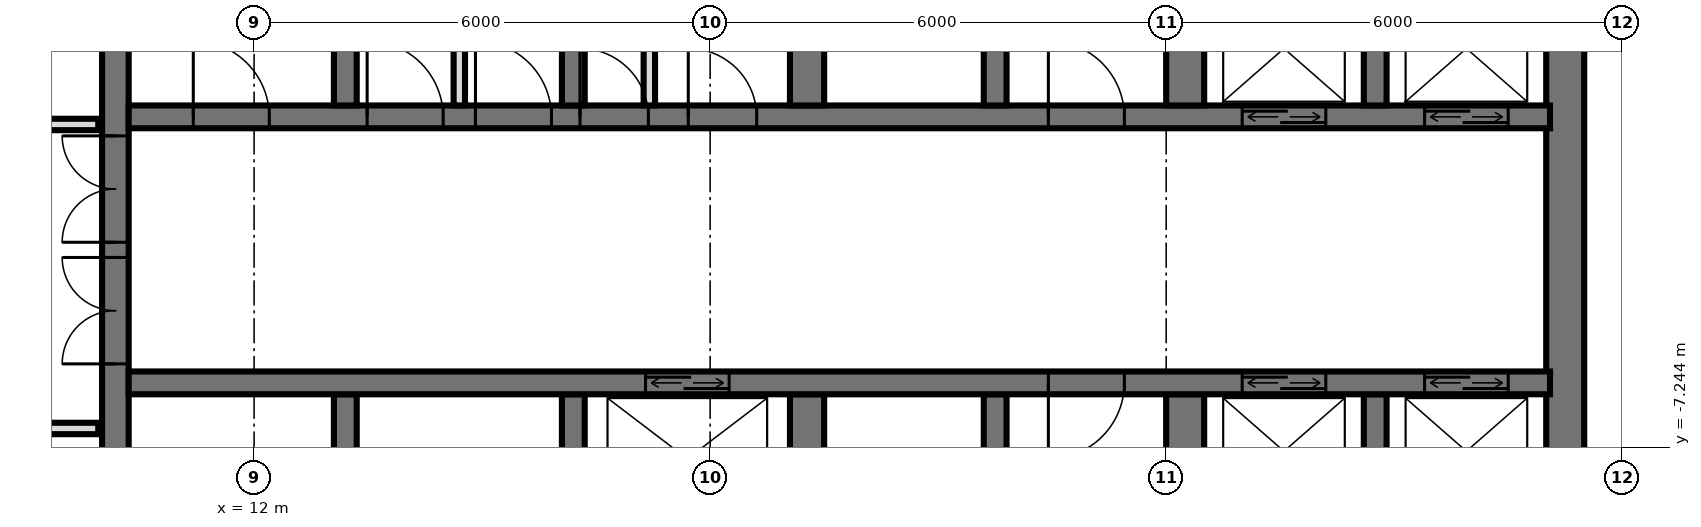
"""IFC4 building model, lengths in metres.
Left out: names, types, materials, properties, quantities, classifications, styles, units other than length and angle.
Written with IfcOpenShell. Run it as: python <this file> out.ifc"""

import sys

from ifc_helpers import new_model, si_unit, direction, frame, frame_2d, origin, place, context, subcontext, project, spatial, rectangle, extrude, element, fill, save


model = new_model("IFC4")
c1 = context("Model", 3, precision=1e-05, world=origin(), true_north=direction((0.0, 1.0)))
c2 = subcontext(c1, "Body", "Model", "MODEL_VIEW")
j1 = project(units=[si_unit("LENGTHUNIT", "METRE"), si_unit("PLANEANGLEUNIT", "RADIAN")], contexts=[c1])
p1 = place(None, origin())
s1 = spatial("IfcSite", under=j1, at=p1, CompositionType="ELEMENT")
p2 = place(p1, origin())
s2 = spatial("IfcBuilding", under=s1, at=p2, CompositionType="ELEMENT")
p3 = place(p2, frame((0.0, 0.0, 81.6)))
s3 = spatial("IfcBuildingStorey", under=s2, at=p3, CompositionType="ELEMENT", Elevation=81.6)
p4 = place(p3, frame((10.175, -14.55, 0.0), z_axis=(0.0, 0.0, 1.0), x_axis=(0.0, 1.0, 0.0)))
e1 = element("IfcWall", 1, at=p4, inside=s3, PredefinedType="SHEAR", context=c2, shape_type="SweptSolid", body=[
    extrude(rectangle(XDim=14.1, YDim=0.35, at=frame_2d((7.05, 0.0))), origin(), (0.0, 0.0, 1.0), 3.6),
])
p5 = place(p4, frame((8.4, 0.0, 0.0)))
e2 = element("IfcOpeningElement", 2, at=p5, cuts=e1, PredefinedType="OPENING", context=c2, shape_type="SweptSolid", body=[
    extrude(rectangle(XDim=1.4, YDim=2.4, at=frame_2d((0.7, 1.2))), frame((0.0, 0.185, 0.0), z_axis=(0.0, -1.0, 0.0), x_axis=(1.0, 0.0, 0.0)), (0.0, 0.0, 1.0), 0.37),
])
p6 = place(p4, frame((10.0, 0.0, 0.0)))
e3 = element("IfcOpeningElement", 3, at=p6, cuts=e1, PredefinedType="OPENING", context=c2, shape_type="SweptSolid", body=[
    extrude(rectangle(XDim=1.4, YDim=2.4, at=frame_2d((0.7, 1.2))), frame((0.0, 0.185, 0.0), z_axis=(0.0, -1.0, 0.0), x_axis=(1.0, 0.0, 0.0)), (0.0, 0.0, 1.0), 0.37),
])
p7 = place(p4, frame((4.0, 0.0, 0.0)))
e4 = element("IfcOpeningElement", 4, at=p7, cuts=e1, PredefinedType="OPENING", context=c2, shape_type="SweptSolid", body=[
    extrude(rectangle(XDim=1.2, YDim=2.1, at=frame_2d((0.6, 1.05))), frame((0.0, 0.185, 0.0), z_axis=(0.0, -1.0, 0.0), x_axis=(1.0, 0.0, 0.0)), (0.0, 0.0, 1.0), 0.37),
])
p8 = place(p3, frame((29.25, -14.55, 0.0), z_axis=(0.0, 0.0, 1.0), x_axis=(0.0, 1.0, 0.0)))
e5 = element("IfcWall", 5, at=p8, inside=s3, PredefinedType="SHEAR", context=c2, shape_type="SweptSolid", body=[
    extrude(rectangle(XDim=14.1, YDim=0.5, at=frame_2d((7.05, 0.0))), origin(), (0.0, 0.0, 1.0), 3.6),
])
p9 = place(p3, frame((10.35, -2.9, 0.0), z_axis=(0.0, 0.0, 1.0), x_axis=(1.0, 0.0, 0.0)))
e6 = element("IfcWall", 6, at=p9, inside=s3, PredefinedType="SHEAR", context=c2, shape_type="SweptSolid", body=[
    extrude(rectangle(XDim=18.7, YDim=0.3, at=frame_2d((9.35, 0.0))), origin(), (0.0, 0.0, 1.0), 3.6),
])
p10 = place(p9, frame((14.65, 0.0, 0.0)))
e7 = element("IfcOpeningElement", 7, at=p10, cuts=e6, PredefinedType="OPENING", context=c2, shape_type="SweptSolid", body=[
    extrude(rectangle(XDim=1.1, YDim=2.1, at=frame_2d((0.55, 1.05))), frame((0.0, 0.16, 0.0), z_axis=(0.0, -1.0, 0.0), x_axis=(1.0, 0.0, 0.0)), (0.0, 0.0, 1.0), 0.32),
])
p11 = place(p9, frame((17.05, 0.0, 0.0)))
e8 = element("IfcOpeningElement", 8, at=p11, cuts=e6, PredefinedType="OPENING", context=c2, shape_type="SweptSolid", body=[
    extrude(rectangle(XDim=1.1, YDim=2.1, at=frame_2d((0.55, 1.05))), frame((0.0, 0.16, 0.0), z_axis=(0.0, -1.0, 0.0), x_axis=(1.0, 0.0, 0.0)), (0.0, 0.0, 1.0), 0.32),
])
p12 = place(p9, frame((5.938, 0.0, 0.0)))
e9 = element("IfcOpeningElement", 9, at=p12, cuts=e6, PredefinedType="OPENING", context=c2, shape_type="SweptSolid", body=[
    extrude(rectangle(XDim=0.9, YDim=2.1, at=frame_2d((0.45, 1.05))), frame((0.0, 0.16, 0.0), z_axis=(0.0, -1.0, 0.0), x_axis=(1.0, 0.0, 0.0)), (0.0, 0.0, 1.0), 0.32),
])
p13 = place(p9, frame((7.363, 0.0, 0.0)))
e10 = element("IfcOpeningElement", 10, at=p13, cuts=e6, PredefinedType="OPENING", context=c2, shape_type="SweptSolid", body=[
    extrude(rectangle(XDim=0.9, YDim=2.1, at=frame_2d((0.45, 1.05))), frame((0.0, 0.16, 0.0), z_axis=(0.0, -1.0, 0.0), x_axis=(1.0, 0.0, 0.0)), (0.0, 0.0, 1.0), 0.32),
])
p14 = place(p9, frame((0.85, 0.0, 0.0)))
e11 = element("IfcOpeningElement", 11, at=p14, cuts=e6, PredefinedType="OPENING", context=c2, shape_type="SweptSolid", body=[
    extrude(rectangle(XDim=1.0, YDim=2.1, at=frame_2d((0.5, 1.05))), frame((0.0, 0.16, 0.0), z_axis=(0.0, -1.0, 0.0), x_axis=(1.0, 0.0, 0.0)), (0.0, 0.0, 1.0), 0.32),
])
p15 = place(p9, frame((3.137, 0.0, 0.0)))
e12 = element("IfcOpeningElement", 12, at=p15, cuts=e6, PredefinedType="OPENING", context=c2, shape_type="SweptSolid", body=[
    extrude(rectangle(XDim=1.0, YDim=2.1, at=frame_2d((0.5, 1.05))), frame((0.0, 0.16, 0.0), z_axis=(0.0, -1.0, 0.0), x_axis=(1.0, 0.0, 0.0)), (0.0, 0.0, 1.0), 0.32),
])
p16 = place(p9, frame((4.562, 0.0, 0.0)))
e13 = element("IfcOpeningElement", 13, at=p16, cuts=e6, PredefinedType="OPENING", context=c2, shape_type="SweptSolid", body=[
    extrude(rectangle(XDim=1.0, YDim=2.1, at=frame_2d((0.5, 1.05))), frame((0.0, 0.16, 0.0), z_axis=(0.0, -1.0, 0.0), x_axis=(1.0, 0.0, 0.0)), (0.0, 0.0, 1.0), 0.32),
])
p17 = place(p9, frame((12.1, 0.0, 0.0)))
e14 = element("IfcOpeningElement", 14, at=p17, cuts=e6, PredefinedType="OPENING", context=c2, shape_type="SweptSolid", body=[
    extrude(rectangle(XDim=1.0, YDim=2.1, at=frame_2d((0.5, 1.05))), frame((0.0, 0.16, 0.0), z_axis=(0.0, -1.0, 0.0), x_axis=(1.0, 0.0, 0.0)), (0.0, 0.0, 1.0), 0.32),
])
p18 = place(p3, frame((10.35, -6.4, 0.0), z_axis=(0.0, 0.0, 1.0), x_axis=(1.0, 0.0, 0.0)))
e15 = element("IfcWall", 15, at=p18, inside=s3, PredefinedType="SHEAR", context=c2, shape_type="SweptSolid", body=[
    extrude(rectangle(XDim=18.7, YDim=0.3, at=frame_2d((9.35, 0.0))), origin(), (0.0, 0.0, 1.0), 3.6),
])
p19 = place(p18, frame((14.65, 0.0, 0.0)))
e16 = element("IfcOpeningElement", 16, at=p19, cuts=e15, PredefinedType="OPENING", context=c2, shape_type="SweptSolid", body=[
    extrude(rectangle(XDim=1.1, YDim=2.1, at=frame_2d((0.55, 1.05))), frame((0.0, 0.16, 0.0), z_axis=(0.0, -1.0, 0.0), x_axis=(1.0, 0.0, 0.0)), (0.0, 0.0, 1.0), 0.32),
])
p20 = place(p18, frame((17.05, 0.0, 0.0)))
e17 = element("IfcOpeningElement", 17, at=p20, cuts=e15, PredefinedType="OPENING", context=c2, shape_type="SweptSolid", body=[
    extrude(rectangle(XDim=1.1, YDim=2.1, at=frame_2d((0.55, 1.05))), frame((0.0, 0.16, 0.0), z_axis=(0.0, -1.0, 0.0), x_axis=(1.0, 0.0, 0.0)), (0.0, 0.0, 1.0), 0.32),
])
p21 = place(p18, frame((6.8, 0.0, 0.0)))
e18 = element("IfcOpeningElement", 18, at=p21, cuts=e15, PredefinedType="OPENING", context=c2, shape_type="SweptSolid", body=[
    extrude(rectangle(XDim=1.1, YDim=2.1, at=frame_2d((0.55, 1.05))), frame((0.0, 0.16, 0.0), z_axis=(0.0, -1.0, 0.0), x_axis=(1.0, 0.0, 0.0)), (0.0, 0.0, 1.0), 0.32),
])
p22 = place(p18, frame((12.1, 0.0, 0.0)))
e19 = element("IfcOpeningElement", 19, at=p22, cuts=e15, PredefinedType="OPENING", context=c2, shape_type="SweptSolid", body=[
    extrude(rectangle(XDim=1.0, YDim=2.1, at=frame_2d((0.5, 1.05))), frame((0.0, 0.16, 0.0), z_axis=(0.0, -1.0, 0.0), x_axis=(1.0, 0.0, 0.0)), (0.0, 0.0, 1.0), 0.32),
])
for number, where, z_axis, x_axis in (
    (20, (13.2, -2.75, 0.0), (0.0, 0.0, 1.0), (0.0, 1.0, 0.0)),
    (21, (13.2, -8.85, 0.0), (0.0, 0.0, 1.0), (0.0, 1.0, 0.0)),
    (22, (16.2, -2.75, 0.0), (0.0, 0.0, 1.0), (0.0, 1.0, 0.0)),
    (23, (16.2, -8.85, 0.0), (0.0, 0.0, 1.0), (0.0, 1.0, 0.0)),
):
    element("IfcWall", number, at=place(p3, frame(where, z_axis=z_axis, x_axis=x_axis)), inside=s3, PredefinedType="SHEAR", context=c2, shape_type="SweptSolid", body=[
        extrude(rectangle(XDim=2.3, YDim=0.3, at=frame_2d((1.15, 0.0))), origin(), (0.0, 0.0, 1.0), 3.6),
    ])
for number, where, z_axis, x_axis in (
    (24, (19.275, -2.75, 0.0), (0.0, 0.0, 1.0), (0.0, 1.0, 0.0)),
    (25, (19.275, -8.85, 0.0), (0.0, 0.0, 1.0), (0.0, 1.0, 0.0)),
):
    element("IfcWall", number, at=place(p3, frame(where, z_axis=z_axis, x_axis=x_axis)), inside=s3, PredefinedType="SHEAR", context=c2, shape_type="SweptSolid", body=[
        extrude(rectangle(XDim=2.3, YDim=0.45, at=frame_2d((1.15, 0.0))), origin(), (0.0, 0.0, 1.0), 3.6),
    ])
for number, where, z_axis, x_axis in (
    (26, (21.75, -2.75, 0.0), (0.0, 0.0, 1.0), (0.0, 1.0, 0.0)),
    (27, (21.75, -8.85, 0.0), (0.0, 0.0, 1.0), (0.0, 1.0, 0.0)),
):
    element("IfcWall", number, at=place(p3, frame(where, z_axis=z_axis, x_axis=x_axis)), inside=s3, PredefinedType="SHEAR", context=c2, shape_type="SweptSolid", body=[
        extrude(rectangle(XDim=2.3, YDim=0.3, at=frame_2d((1.15, 0.0))), origin(), (0.0, 0.0, 1.0), 3.6),
    ])
for number, where, z_axis, x_axis in (
    (28, (24.25, -2.75, 0.0), (0.0, 0.0, 1.0), (0.0, 1.0, 0.0)),
    (29, (24.25, -8.85, 0.0), (0.0, 0.0, 1.0), (0.0, 1.0, 0.0)),
):
    element("IfcWall", number, at=place(p3, frame(where, z_axis=z_axis, x_axis=x_axis)), inside=s3, PredefinedType="SHEAR", context=c2, shape_type="SweptSolid", body=[
        extrude(rectangle(XDim=2.3, YDim=0.5, at=frame_2d((1.15, 0.0))), origin(), (0.0, 0.0, 1.0), 3.6),
    ])
for number, where, z_axis, x_axis in (
    (30, (26.75, -2.75, 0.0), (0.0, 0.0, 1.0), (0.0, 1.0, 0.0)),
    (31, (26.75, -8.85, 0.0), (0.0, 0.0, 1.0), (0.0, 1.0, 0.0)),
):
    element("IfcWall", number, at=place(p3, frame(where, z_axis=z_axis, x_axis=x_axis)), inside=s3, PredefinedType="SHEAR", context=c2, shape_type="SweptSolid", body=[
        extrude(rectangle(XDim=2.3, YDim=0.3, at=frame_2d((1.15, 0.0))), origin(), (0.0, 0.0, 1.0), 3.6),
    ])
for number, where, z_axis, x_axis in (
    (32, (17.2, -2.75, 0.0), (0.0, 0.0, 1.0), (0.0, 1.0, 0.0)),
    (33, (14.7, -2.75, 0.0), (0.0, 0.0, 1.0), (0.0, 1.0, 0.0)),
):
    element("IfcWall", number, at=place(p3, frame(where, z_axis=z_axis, x_axis=x_axis)), inside=s3, PredefinedType="PARTITIONING", context=c2, shape_type="SweptSolid", body=[
        extrude(rectangle(XDim=2.3, YDim=0.15, at=frame_2d((1.15, 0.0))), origin(), (0.0, 0.0, 1.0), 3.3),
    ])
p23 = place(p3, frame((-9.95, -7.0, 0.0), z_axis=(0.0, 0.0, 1.0), x_axis=(1.0, 0.0, 0.0)))
e34 = element("IfcWall", 34, at=p23, inside=s3, PredefinedType="PARTITIONING", context=c2, shape_type="SweptSolid", body=[
    extrude(rectangle(XDim=19.9, YDim=0.15, at=frame_2d((9.95, 0.0))), origin(), (0.0, 0.0, 1.0), 3.32),
])
p24 = place(p23, frame((9.45, 0.0, 0.0)))
e35 = element("IfcOpeningElement", 35, at=p24, cuts=e34, PredefinedType="OPENING", context=c2, shape_type="SweptSolid", body=[
    extrude(rectangle(XDim=1.0, YDim=2.1, at=frame_2d((0.5, 1.05))), frame((0.0, 0.085, 0.0), z_axis=(0.0, -1.0, 0.0), x_axis=(1.0, 0.0, 0.0)), (0.0, 0.0, 1.0), 0.17),
])
p25 = place(p23, frame((15.45, 0.0, 0.0)))
e36 = element("IfcOpeningElement", 36, at=p25, cuts=e34, PredefinedType="OPENING", context=c2, shape_type="SweptSolid", body=[
    extrude(rectangle(XDim=1.0, YDim=2.1, at=frame_2d((0.5, 1.05))), frame((0.0, 0.085, 0.0), z_axis=(0.0, -1.0, 0.0), x_axis=(1.0, 0.0, 0.0)), (0.0, 0.0, 1.0), 0.17),
])
p26 = place(p3, frame((-9.95, -3.0, 0.0), z_axis=(0.0, 0.0, 1.0), x_axis=(1.0, 0.0, 0.0)))
e37 = element("IfcWall", 37, at=p26, inside=s3, PredefinedType="PARTITIONING", context=c2, shape_type="SweptSolid", body=[
    extrude(rectangle(XDim=19.9, YDim=0.15, at=frame_2d((9.95, 0.0))), origin(), (0.0, 0.0, 1.0), 3.32),
])
p27 = place(p26, frame((2.2, 0.0, 0.0)))
e38 = element("IfcOpeningElement", 38, at=p27, cuts=e37, PredefinedType="OPENING", context=c2, shape_type="SweptSolid", body=[
    extrude(rectangle(XDim=1.0, YDim=2.1, at=frame_2d((0.5, 1.05))), frame((0.0, 0.085, 0.0), z_axis=(0.0, -1.0, 0.0), x_axis=(1.0, 0.0, 0.0)), (0.0, 0.0, 1.0), 0.17),
])
p28 = place(p26, frame((7.2, 0.0, 0.0)))
e39 = element("IfcOpeningElement", 39, at=p28, cuts=e37, PredefinedType="OPENING", context=c2, shape_type="SweptSolid", body=[
    extrude(rectangle(XDim=1.0, YDim=2.1, at=frame_2d((0.5, 1.05))), frame((0.0, 0.085, 0.0), z_axis=(0.0, -1.0, 0.0), x_axis=(1.0, 0.0, 0.0)), (0.0, 0.0, 1.0), 0.17),
])
p29 = place(p26, frame((11.7, 0.0, 0.0)))
e40 = element("IfcOpeningElement", 40, at=p29, cuts=e37, PredefinedType="OPENING", context=c2, shape_type="SweptSolid", body=[
    extrude(rectangle(XDim=1.0, YDim=2.1, at=frame_2d((0.5, 1.05))), frame((0.0, 0.085, 0.0), z_axis=(0.0, -1.0, 0.0), x_axis=(1.0, 0.0, 0.0)), (0.0, 0.0, 1.0), 0.17),
])
p30 = place(p26, frame((15.45, 0.0, 0.0)))
e41 = element("IfcOpeningElement", 41, at=p30, cuts=e37, PredefinedType="OPENING", context=c2, shape_type="SweptSolid", body=[
    extrude(rectangle(XDim=1.0, YDim=2.1, at=frame_2d((0.5, 1.05))), frame((0.0, 0.085, 0.0), z_axis=(0.0, -1.0, 0.0), x_axis=(1.0, 0.0, 0.0)), (0.0, 0.0, 1.0), 0.17),
])
p31 = place(p26, frame((18.2, 0.0, 0.0)))
e42 = element("IfcOpeningElement", 42, at=p31, cuts=e37, PredefinedType="OPENING", context=c2, shape_type="SweptSolid", body=[
    extrude(rectangle(XDim=1.0, YDim=2.1, at=frame_2d((0.5, 1.05))), frame((0.0, 0.085, 0.0), z_axis=(0.0, -1.0, 0.0), x_axis=(1.0, 0.0, 0.0)), (0.0, 0.0, 1.0), 0.17),
])
p32 = place(p10, origin())
e43 = element("IfcDoor", 43, at=p32, inside=s3, OperationType="DOUBLE_DOOR_SLIDING", PredefinedType="USERDEFINED", context=c2, shape_type="SweptSolid", body=[
    extrude(rectangle(XDim=1.1, YDim=2.1, at=frame_2d((0.55, 1.05))), frame((0.0, 0.025, 0.0), z_axis=(0.0, -1.0, 0.0), x_axis=(1.0, 0.0, 0.0)), (0.0, 0.0, 1.0), 0.05),
])
fill(e7, e43)
p33 = place(p11, origin())
e44 = element("IfcDoor", 44, at=p33, inside=s3, OperationType="DOUBLE_DOOR_SLIDING", PredefinedType="USERDEFINED", context=c2, shape_type="SweptSolid", body=[
    extrude(rectangle(XDim=1.1, YDim=2.1, at=frame_2d((0.55, 1.05))), frame((0.0, 0.025, 0.0), z_axis=(0.0, -1.0, 0.0), x_axis=(1.0, 0.0, 0.0)), (0.0, 0.0, 1.0), 0.05),
])
fill(e8, e44)
p34 = place(p19, origin())
e45 = element("IfcDoor", 45, at=p34, inside=s3, OperationType="DOUBLE_DOOR_SLIDING", PredefinedType="USERDEFINED", context=c2, shape_type="SweptSolid", body=[
    extrude(rectangle(XDim=1.1, YDim=2.1, at=frame_2d((0.55, 1.05))), frame((0.0, 0.025, 0.0), z_axis=(0.0, -1.0, 0.0), x_axis=(1.0, 0.0, 0.0)), (0.0, 0.0, 1.0), 0.05),
])
fill(e16, e45)
p35 = place(p20, origin())
e46 = element("IfcDoor", 46, at=p35, inside=s3, OperationType="DOUBLE_DOOR_SLIDING", PredefinedType="USERDEFINED", context=c2, shape_type="SweptSolid", body=[
    extrude(rectangle(XDim=1.1, YDim=2.1, at=frame_2d((0.55, 1.05))), frame((0.0, 0.025, 0.0), z_axis=(0.0, -1.0, 0.0), x_axis=(1.0, 0.0, 0.0)), (0.0, 0.0, 1.0), 0.05),
])
fill(e17, e46)
p36 = place(p21, origin())
e47 = element("IfcDoor", 47, at=p36, inside=s3, OperationType="DOUBLE_DOOR_SLIDING", PredefinedType="USERDEFINED", context=c2, shape_type="SweptSolid", body=[
    extrude(rectangle(XDim=1.1, YDim=2.1, at=frame_2d((0.55, 1.05))), frame((0.0, 0.025, 0.0), z_axis=(0.0, -1.0, 0.0), x_axis=(1.0, 0.0, 0.0)), (0.0, 0.0, 1.0), 0.05),
])
fill(e18, e47)
p37 = place(p5, origin())
e48 = element("IfcDoor", 48, at=p37, inside=s3, OperationType="DOUBLE_DOOR_SINGLE_SWING", PredefinedType="DOOR", context=c2, shape_type="SweptSolid", body=[
    extrude(rectangle(XDim=1.4, YDim=2.4, at=frame_2d((0.7, 1.2))), frame((0.0, 0.025, 0.0), z_axis=(0.0, -1.0, 0.0), x_axis=(1.0, 0.0, 0.0)), (0.0, 0.0, 1.0), 0.05),
])
fill(e2, e48)
p38 = place(p6, origin())
e49 = element("IfcDoor", 49, at=p38, inside=s3, OperationType="DOUBLE_DOOR_SINGLE_SWING", PredefinedType="DOOR", context=c2, shape_type="SweptSolid", body=[
    extrude(rectangle(XDim=1.4, YDim=2.4, at=frame_2d((0.7, 1.2))), frame((0.0, 0.025, 0.0), z_axis=(0.0, -1.0, 0.0), x_axis=(1.0, 0.0, 0.0)), (0.0, 0.0, 1.0), 0.05),
])
fill(e3, e49)
p39 = place(p12, origin())
e50 = element("IfcDoor", 50, at=p39, inside=s3, OperationType="SINGLE_SWING_RIGHT", PredefinedType="DOOR", context=c2, shape_type="SweptSolid", body=[
    extrude(rectangle(XDim=0.9, YDim=2.1, at=frame_2d((0.45, 1.05))), frame((0.0, 0.025, 0.0), z_axis=(0.0, -1.0, 0.0), x_axis=(1.0, 0.0, 0.0)), (0.0, 0.0, 1.0), 0.05),
])
fill(e9, e50)
p40 = place(p13, origin())
e51 = element("IfcDoor", 51, at=p40, inside=s3, OperationType="SINGLE_SWING_RIGHT", PredefinedType="DOOR", context=c2, shape_type="SweptSolid", body=[
    extrude(rectangle(XDim=0.9, YDim=2.1, at=frame_2d((0.45, 1.05))), frame((0.0, 0.025, 0.0), z_axis=(0.0, -1.0, 0.0), x_axis=(1.0, 0.0, 0.0)), (0.0, 0.0, 1.0), 0.05),
])
fill(e10, e51)
p41 = place(p14, origin())
e52 = element("IfcDoor", 52, at=p41, inside=s3, OperationType="SINGLE_SWING_RIGHT", PredefinedType="DOOR", context=c2, shape_type="SweptSolid", body=[
    extrude(rectangle(XDim=1.0, YDim=2.1, at=frame_2d((0.5, 1.05))), frame((0.0, 0.025, 0.0), z_axis=(0.0, -1.0, 0.0), x_axis=(1.0, 0.0, 0.0)), (0.0, 0.0, 1.0), 0.05),
])
fill(e11, e52)
p42 = place(p15, origin())
e53 = element("IfcDoor", 53, at=p42, inside=s3, OperationType="SINGLE_SWING_RIGHT", PredefinedType="DOOR", context=c2, shape_type="SweptSolid", body=[
    extrude(rectangle(XDim=1.0, YDim=2.1, at=frame_2d((0.5, 1.05))), frame((0.0, 0.025, 0.0), z_axis=(0.0, -1.0, 0.0), x_axis=(1.0, 0.0, 0.0)), (0.0, 0.0, 1.0), 0.05),
])
fill(e12, e53)
p43 = place(p16, origin())
e54 = element("IfcDoor", 54, at=p43, inside=s3, OperationType="SINGLE_SWING_RIGHT", PredefinedType="DOOR", context=c2, shape_type="SweptSolid", body=[
    extrude(rectangle(XDim=1.0, YDim=2.1, at=frame_2d((0.5, 1.05))), frame((0.0, 0.025, 0.0), z_axis=(0.0, -1.0, 0.0), x_axis=(1.0, 0.0, 0.0)), (0.0, 0.0, 1.0), 0.05),
])
fill(e13, e54)
p44 = place(p17, origin())
e55 = element("IfcDoor", 55, at=p44, inside=s3, OperationType="SINGLE_SWING_RIGHT", PredefinedType="DOOR", context=c2, shape_type="SweptSolid", body=[
    extrude(rectangle(XDim=1.0, YDim=2.1, at=frame_2d((0.5, 1.05))), frame((0.0, 0.025, 0.0), z_axis=(0.0, -1.0, 0.0), x_axis=(1.0, 0.0, 0.0)), (0.0, 0.0, 1.0), 0.05),
])
fill(e14, e55)
p45 = place(p22, frame((0.5, 0.0, 0.0), z_axis=(0.0, 0.0, 1.0), x_axis=(-1.0, 0.0, 0.0)))
e56 = element("IfcDoor", 56, at=p45, inside=s3, OperationType="SINGLE_SWING_LEFT", PredefinedType="DOOR", context=c2, shape_type="SweptSolid", body=[
    extrude(rectangle(XDim=1.0, YDim=2.1, at=frame_2d((0.0, 1.05))), frame((0.0, -0.025, 0.0), z_axis=(0.0, 1.0, 0.0), x_axis=(-1.0, 0.0, 0.0)), (0.0, 0.0, 1.0), 0.05),
])
fill(e19, e56)
save(model, sys.argv[1])
